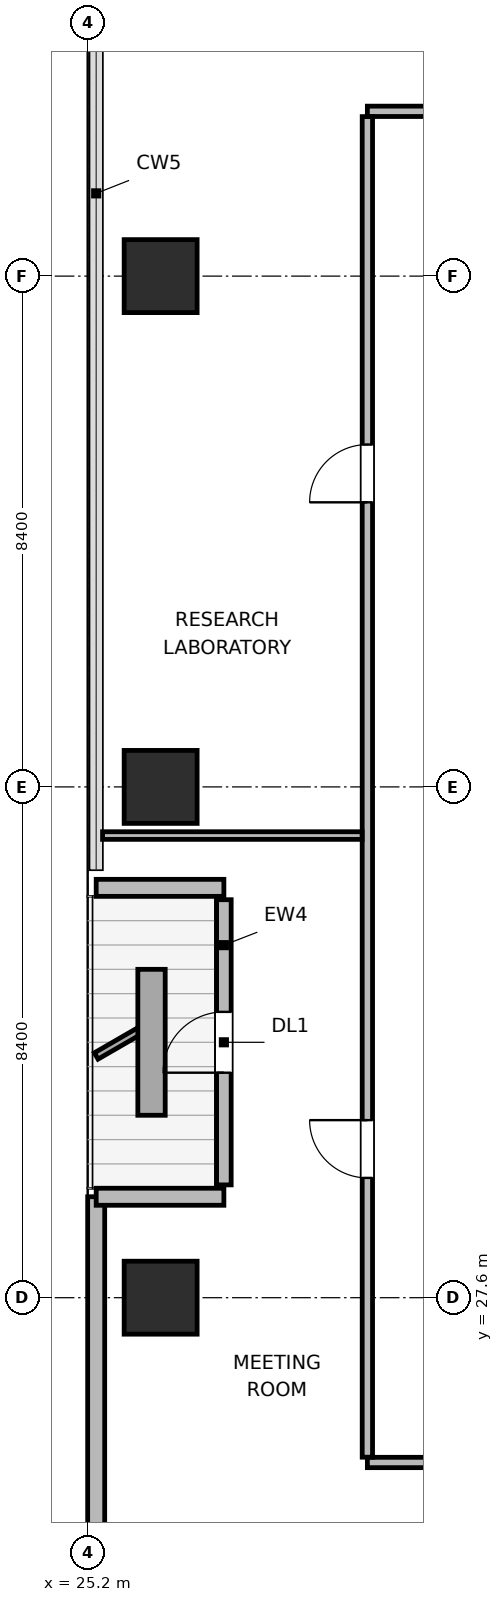
"""IFC4 building model, lengths in metres.
Left out: names, types, materials, properties, quantities, classifications, styles, units other than length and angle.
Written with IfcOpenShell. Run it as: python <this file> out.ifc"""

import sys

from ifc_helpers import new_model, si_unit, direction, frame, frame_2d, origin, origin_2d, place, context, subcontext, project, spatial, rectangle, extrude, element, fill, save


model = new_model("IFC4")
c1 = context("Model", 3, precision=1e-05, world=origin(), true_north=direction((0.0, 1.0)))
c2 = subcontext(c1, "Body", "Model", "MODEL_VIEW")
j1 = project(units=[si_unit("LENGTHUNIT", "METRE"), si_unit("PLANEANGLEUNIT", "RADIAN")], contexts=[c1])
p1 = place(None, origin())
s1 = spatial("IfcSite", under=j1, at=p1, CompositionType="ELEMENT")
p2 = place(p1, origin())
s2 = spatial("IfcBuilding", under=s1, at=p2, CompositionType="ELEMENT")
p3 = place(p2, frame((0.0, 0.0, 214.8)))
s3 = spatial("IfcBuildingStorey", under=s2, at=p3, CompositionType="ELEMENT", Elevation=214.8)
for number, where, z_axis, x_axis in (
    (1, (26.4, 27.6, 0.0), (0.0, 0.0, 1.0), (1.0, 0.0, 0.0)),
    (2, (26.4, 36.0, 0.0), (0.0, 0.0, 1.0), (1.0, 0.0, 0.0)),
    (3, (26.4, 44.4, 0.0), (0.0, 0.0, 1.0), (1.0, 0.0, 0.0)),
):
    element("IfcColumn", number, at=place(p3, frame(where, z_axis=z_axis, x_axis=x_axis)), inside=s3, PredefinedType="COLUMN", context=c2, shape_type="SweptSolid", body=[
        extrude(rectangle(XDim=1.2, YDim=1.2, at=origin_2d()), origin(), (0.0, 0.0, 1.0), 4.5),
    ])
p4 = place(p3, frame((25.34, 23.818, 0.0), z_axis=(0.0, 0.0, 1.0), x_axis=(0.0, 1.0, 0.0)))
e4 = element("IfcWall", 4, at=p4, inside=s3, PredefinedType="SOLIDWALL", context=c2, shape_type="SweptSolid", body=[
    extrude(rectangle(XDim=5.442, YDim=0.28, at=frame_2d((2.721, 0.0))), origin(), (0.0, 0.0, 1.0), 4.28),
])
p5 = place(p3, frame((25.34, 29.26, 0.0), z_axis=(0.0, 0.0, 1.0), x_axis=(1.0, 0.0, 0.0)))
e5 = element("IfcWall", 5, at=p5, inside=s3, PredefinedType="SOLIDWALL", context=c2, shape_type="SweptSolid", body=[
    extrude(rectangle(XDim=2.1, YDim=0.28, at=frame_2d((1.05, 0.0))), origin(), (0.0, 0.0, 1.0), 3.716),
])
p6 = place(p3, frame((27.44, 29.455, 0.0), z_axis=(0.0, 0.0, 1.0), x_axis=(0.0, 1.0, 0.0)))
e6 = element("IfcWall", 6, at=p6, inside=s3, PredefinedType="SOLIDWALL", context=c2, shape_type="SweptSolid", body=[
    extrude(rectangle(XDim=4.69, YDim=0.24, at=frame_2d((2.345, 0.0))), origin(), (0.0, 0.0, 1.0), 3.848),
])
p7 = place(p6, frame((1.845, 0.0, 0.0)))
e7 = element("IfcOpeningElement", 7, at=p7, cuts=e6, PredefinedType="OPENING", context=c2, shape_type="SweptSolid", body=[
    extrude(rectangle(XDim=1.0, YDim=2.02, at=frame_2d((0.5, 1.01))), frame((0.0, 0.13, 0.0), z_axis=(0.0, -1.0, 0.0), x_axis=(1.0, 0.0, 0.0)), (0.0, 0.0, 1.0), 0.26),
])
p8 = place(p3, frame((27.44, 34.34, 0.0), z_axis=(0.0, 0.0, 1.0), x_axis=(-1.0, 0.0, 0.0)))
e8 = element("IfcWall", 8, at=p8, inside=s3, PredefinedType="SOLIDWALL", context=c2, shape_type="SweptSolid", body=[
    extrude(rectangle(XDim=2.1, YDim=0.28, at=frame_2d((1.05, 0.0))), origin(), (0.0, 0.0, 1.0), 3.716),
])
p9 = place(p3, frame((29.8, 24.89, 0.0), z_axis=(0.0, 0.0, 1.0), x_axis=(1.0, 0.0, 0.0)))
e9 = element("IfcWall", 9, at=p9, inside=s3, PredefinedType="PARTITIONING", context=c2, shape_type="SweptSolid", body=[
    extrude(rectangle(XDim=33.8, YDim=0.17, at=frame_2d((16.9, 0.0))), origin(), (0.0, 0.0, 1.0), 4.28),
])
p10 = place(p9, frame((2.74, 0.0, 0.0)))
e10 = element("IfcOpeningElement", 10, at=p10, cuts=e9, PredefinedType="OPENING", context=c2, shape_type="SweptSolid", body=[
    extrude(rectangle(XDim=0.95, YDim=2.04, at=frame_2d((0.475, 1.02))), frame((0.0, 0.095, 0.0), z_axis=(0.0, -1.0, 0.0), x_axis=(1.0, 0.0, 0.0)), (0.0, 0.0, 1.0), 0.19),
])
p11 = place(p9, frame((8.575, 0.0, 0.0)))
e11 = element("IfcOpeningElement", 11, at=p11, cuts=e9, PredefinedType="OPENING", context=c2, shape_type="SweptSolid", body=[
    extrude(rectangle(XDim=0.95, YDim=2.04, at=frame_2d((0.475, 1.02))), frame((0.0, 0.095, 0.0), z_axis=(0.0, -1.0, 0.0), x_axis=(1.0, 0.0, 0.0)), (0.0, 0.0, 1.0), 0.19),
])
p12 = place(p9, frame((13.81, 0.0, 0.0)))
e12 = element("IfcOpeningElement", 12, at=p12, cuts=e9, PredefinedType="OPENING", context=c2, shape_type="SweptSolid", body=[
    extrude(rectangle(XDim=0.95, YDim=2.04, at=frame_2d((0.475, 1.02))), frame((0.0, 0.095, 0.0), z_axis=(0.0, -1.0, 0.0), x_axis=(1.0, 0.0, 0.0)), (0.0, 0.0, 1.0), 0.19),
])
p13 = place(p9, frame((19.04, 0.0, 0.0)))
e13 = element("IfcOpeningElement", 13, at=p13, cuts=e9, PredefinedType="OPENING", context=c2, shape_type="SweptSolid", body=[
    extrude(rectangle(XDim=0.95, YDim=2.04, at=frame_2d((0.475, 1.02))), frame((0.0, 0.095, 0.0), z_axis=(0.0, -1.0, 0.0), x_axis=(1.0, 0.0, 0.0)), (0.0, 0.0, 1.0), 0.19),
])
p14 = place(p9, frame((24.275, 0.0, 0.0)))
e14 = element("IfcOpeningElement", 14, at=p14, cuts=e9, PredefinedType="OPENING", context=c2, shape_type="SweptSolid", body=[
    extrude(rectangle(XDim=0.95, YDim=2.04, at=frame_2d((0.475, 1.02))), frame((0.0, 0.095, 0.0), z_axis=(0.0, -1.0, 0.0), x_axis=(1.0, 0.0, 0.0)), (0.0, 0.0, 1.0), 0.19),
])
p15 = place(p9, frame((30.11, 0.0, 0.0)))
e15 = element("IfcOpeningElement", 15, at=p15, cuts=e9, PredefinedType="OPENING", context=c2, shape_type="SweptSolid", body=[
    extrude(rectangle(XDim=0.95, YDim=2.04, at=frame_2d((0.475, 1.02))), frame((0.0, 0.095, 0.0), z_axis=(0.0, -1.0, 0.0), x_axis=(1.0, 0.0, 0.0)), (0.0, 0.0, 1.0), 0.19),
])
p16 = place(p3, frame((29.8, 47.11, 0.0), z_axis=(0.0, 0.0, 1.0), x_axis=(1.0, 0.0, 0.0)))
e16 = element("IfcWall", 16, at=p16, inside=s3, PredefinedType="PARTITIONING", context=c2, shape_type="SweptSolid", body=[
    extrude(rectangle(XDim=33.8, YDim=0.17, at=frame_2d((16.9, 0.0))), origin(), (0.0, 0.0, 1.0), 4.28),
])
p17 = place(p16, frame((11.27, 0.0, 0.0)))
e17 = element("IfcOpeningElement", 17, at=p17, cuts=e16, PredefinedType="OPENING", context=c2, shape_type="SweptSolid", body=[
    extrude(rectangle(XDim=0.95, YDim=2.04, at=frame_2d((0.475, 1.02))), frame((0.0, 0.095, 0.0), z_axis=(0.0, -1.0, 0.0), x_axis=(1.0, 0.0, 0.0)), (0.0, 0.0, 1.0), 0.19),
])
p18 = place(p16, frame((28.17, 0.0, 0.0)))
e18 = element("IfcOpeningElement", 18, at=p18, cuts=e16, PredefinedType="OPENING", context=c2, shape_type="SweptSolid", body=[
    extrude(rectangle(XDim=0.95, YDim=2.04, at=frame_2d((0.475, 1.02))), frame((0.0, 0.095, 0.0), z_axis=(0.0, -1.0, 0.0), x_axis=(1.0, 0.0, 0.0)), (0.0, 0.0, 1.0), 0.19),
])
p19 = place(p3, frame((29.8, 24.977, 0.0), z_axis=(0.0, 0.0, 1.0), x_axis=(0.0, 1.0, 0.0)))
e19 = element("IfcWall", 19, at=p19, inside=s3, PredefinedType="PARTITIONING", context=c2, shape_type="SweptSolid", body=[
    extrude(rectangle(XDim=22.046, YDim=0.17, at=frame_2d((11.023, 0.0))), origin(), (0.0, 0.0, 1.0), 4.28),
])
p20 = place(p19, frame((4.593, 0.0, 0.0)))
e20 = element("IfcOpeningElement", 20, at=p20, cuts=e19, PredefinedType="OPENING", context=c2, shape_type="SweptSolid", body=[
    extrude(rectangle(XDim=0.95, YDim=2.04, at=frame_2d((0.475, 1.02))), frame((0.0, 0.095, 0.0), z_axis=(0.0, -1.0, 0.0), x_axis=(1.0, 0.0, 0.0)), (0.0, 0.0, 1.0), 0.19),
])
p21 = place(p19, frame((15.703, 0.0, 0.0)))
e21 = element("IfcOpeningElement", 21, at=p21, cuts=e19, PredefinedType="OPENING", context=c2, shape_type="SweptSolid", body=[
    extrude(rectangle(XDim=0.95, YDim=2.04, at=frame_2d((0.475, 1.02))), frame((0.0, 0.095, 0.0), z_axis=(0.0, -1.0, 0.0), x_axis=(1.0, 0.0, 0.0)), (0.0, 0.0, 1.0), 0.19),
])
p22 = place(p3, frame((25.445, 35.2, 0.0), z_axis=(0.0, 0.0, 1.0), x_axis=(1.0, 0.0, 0.0)))
e22 = element("IfcWall", 22, at=p22, inside=s3, PredefinedType="PARTITIONING", context=c2, shape_type="SweptSolid", body=[
    extrude(rectangle(XDim=4.268, YDim=0.125, at=frame_2d((2.134, 0.0))), origin(), (0.0, 0.0, 1.0), 4.28),
])
p23 = place(p7, origin())
e23 = element("IfcDoor", 23, at=p23, inside=s3, OperationType="SINGLE_SWING_LEFT", PredefinedType="DOOR", context=c2, shape_type="SweptSolid", body=[
    extrude(rectangle(XDim=1.0, YDim=2.02, at=frame_2d((0.5, 1.01))), frame((0.0, 0.025, 0.0), z_axis=(0.0, -1.0, 0.0), x_axis=(1.0, 0.0, 0.0)), (0.0, 0.0, 1.0), 0.05),
])
fill(e7, e23)
p24 = place(p20, origin())
e24 = element("IfcDoor", 24, at=p24, inside=s3, OperationType="SINGLE_SWING_RIGHT", PredefinedType="DOOR", context=c2, shape_type="SweptSolid", body=[
    extrude(rectangle(XDim=0.95, YDim=2.04, at=frame_2d((0.475, 1.02))), frame((0.0, 0.025, 0.0), z_axis=(0.0, -1.0, 0.0), x_axis=(1.0, 0.0, 0.0)), (0.0, 0.0, 1.0), 0.05),
])
fill(e20, e24)
p25 = place(p21, origin())
e25 = element("IfcDoor", 25, at=p25, inside=s3, OperationType="SINGLE_SWING_LEFT", PredefinedType="DOOR", context=c2, shape_type="SweptSolid", body=[
    extrude(rectangle(XDim=0.95, YDim=2.04, at=frame_2d((0.475, 1.02))), frame((0.0, 0.025, 0.0), z_axis=(0.0, -1.0, 0.0), x_axis=(1.0, 0.0, 0.0)), (0.0, 0.0, 1.0), 0.05),
])
fill(e21, e25)
save(model, sys.argv[1])
